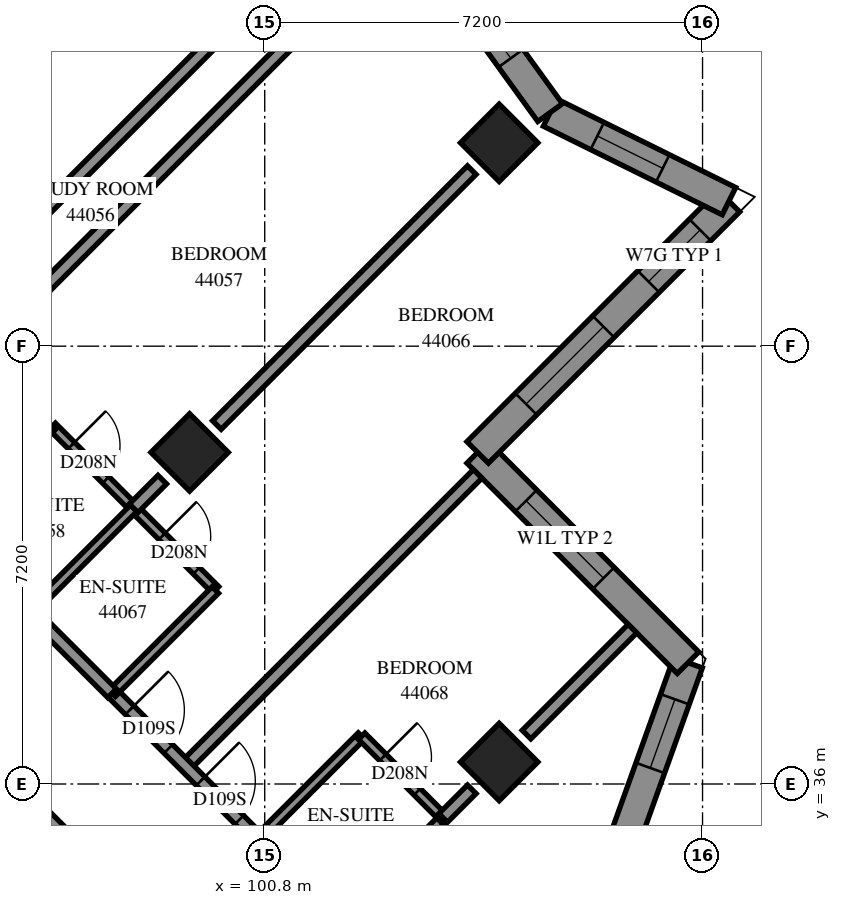
"""IFC4 building model, lengths in metres.
Left out: names, types, materials, properties, quantities, classifications, styles, units other than length and angle.
Written with IfcOpenShell. Run it as: python <this file> out.ifc"""

import sys

from ifc_helpers import new_model, si_unit, direction, frame, frame_2d, origin, origin_2d, place, context, subcontext, project, spatial, polyline, rectangle, outline, extrude, element, fill, save


model = new_model("IFC4")
c1 = context("Model", 3, precision=1e-05, world=origin(), true_north=direction((0.0, 1.0)))
c2 = subcontext(c1, "Body", "Model", "MODEL_VIEW")
j1 = project(units=[si_unit("LENGTHUNIT", "METRE"), si_unit("PLANEANGLEUNIT", "RADIAN")], contexts=[c1])
p1 = place(None, origin())
s1 = spatial("IfcSite", under=j1, at=p1, CompositionType="ELEMENT")
p2 = place(p1, origin())
s2 = spatial("IfcBuilding", under=s1, at=p2, CompositionType="ELEMENT")
p3 = place(p2, frame((0.0, 0.0, 162.6)))
s3 = spatial("IfcBuildingStorey", under=s2, at=p3, CompositionType="ELEMENT", Elevation=162.6)
for number, where, z_axis, x_axis in (
    (1, (104.656, 46.544, 0.0), (0.0, 0.0, 1.0), (0.707, -0.707, 0.0)),
    (2, (99.565, 41.453, 0.0), (0.0, 0.0, 1.0), (0.707, -0.707, 0.0)),
    (3, (104.656, 36.362, 0.0), (0.0, 0.0, 1.0), (0.707, -0.707, 0.0)),
):
    element("IfcColumn", number, at=place(p3, frame(where, z_axis=z_axis, x_axis=x_axis)), inside=s3, PredefinedType="COLUMN", context=c2, shape_type="SweptSolid", body=[
        extrude(rectangle(XDim=0.9, YDim=0.9, at=origin_2d()), origin(), (0.0, 0.0, 1.0), 3.1),
    ])
p4 = place(p3, frame((87.049, 38.695, -0.3), z_axis=(0.0, 0.0, 1.0), x_axis=(0.7071067812, 0.7071067812, 0.0)))
e4 = element("IfcWall", 4, at=p4, inside=s3, PredefinedType="SHEAR", context=c2, shape_type="SweptSolid", body=[
    extrude(rectangle(XDim=14.4, YDim=0.6, at=frame_2d((7.2, 0.0))), origin(), (0.0, 0.0, 1.0), 2.7),
])
p5 = place(p4, frame((4.55, 0.0, 0.3)))
e5 = element("IfcOpeningElement", 5, at=p5, cuts=e4, PredefinedType="OPENING", context=c2, shape_type="SweptSolid", body=[
    extrude(rectangle(XDim=1.1, YDim=2.1, at=frame_2d((0.55, 1.05))), frame((0.0, 0.31, 0.0), z_axis=(0.0, -1.0, 0.0), x_axis=(1.0, 0.0, 0.0)), (0.0, 0.0, 1.0), 0.62),
])
p6 = place(p4, frame((11.35, 0.0, 0.3)))
e6 = element("IfcOpeningElement", 6, at=p6, cuts=e4, PredefinedType="OPENING", context=c2, shape_type="SweptSolid", body=[
    extrude(rectangle(XDim=1.1, YDim=2.1, at=frame_2d((0.55, 1.05))), frame((0.0, 0.31, 0.0), z_axis=(0.0, -1.0, 0.0), x_axis=(1.0, 0.0, 0.0)), (0.0, 0.0, 1.0), 0.62),
])
p7 = place(p3, frame((105.954, 32.957, 0.0), z_axis=(0.0, 0.0, 1.0), x_axis=(0.3376937102, 0.9412560534, 0.0)))
e7 = element("IfcWall", 7, at=p7, inside=s3, PredefinedType="SOLIDWALL", context=c2, shape_type="SweptSolid", body=[
    extrude(outline(polyline([(-0.113, -0.25), (5.51, -0.25), (5.193, 0.25), (0.113, 0.25), (-0.113, -0.25)])), origin(), (0.0, 0.0, 1.0), 3.1),
])
p8 = place(p7, frame((1.173, 0.0, 0.45)))
e8 = element("IfcOpeningElement", 8, at=p8, cuts=e7, PredefinedType="OPENING", context=c2, shape_type="SweptSolid", body=[
    extrude(rectangle(XDim=1.2, YDim=2.5, at=frame_2d((0.6, 1.25))), frame((0.0, 0.26, 0.0), z_axis=(0.0, -1.0, 0.0), x_axis=(1.0, 0.0, 0.0)), (0.0, 0.0, 1.0), 0.52),
])
p9 = place(p7, frame((3.513, 0.0, 0.45)))
e9 = element("IfcOpeningElement", 9, at=p9, cuts=e7, PredefinedType="OPENING", context=c2, shape_type="SweptSolid", body=[
    extrude(rectangle(XDim=1.2, YDim=2.5, at=frame_2d((0.6, 1.25))), frame((0.0, 0.26, 0.0), z_axis=(0.0, -1.0, 0.0), x_axis=(1.0, 0.0, 0.0)), (0.0, 0.0, 1.0), 0.52),
])
p10 = place(p3, frame((107.761, 37.994, 0.0), z_axis=(0.0, 0.0, 1.0), x_axis=(-0.707127224, 0.7070863378, 0.0)))
e10 = element("IfcWall", 10, at=p10, inside=s3, PredefinedType="SOLIDWALL", context=c2, shape_type="SweptSolid", body=[
    extrude(outline(polyline([(-0.159, -0.25), (4.642, -0.25), (5.142, 0.25), (0.159, 0.25), (-0.159, -0.25)])), origin(), (0.0, 0.0, 1.0), 3.1),
])
p11 = place(p10, frame((1.967, 0.0, 0.6)))
e11 = element("IfcOpeningElement", 11, at=p11, cuts=e10, PredefinedType="OPENING", context=c2, shape_type="SweptSolid", body=[
    extrude(rectangle(XDim=1.8, YDim=1.9, at=frame_2d((0.9, 0.95))), frame((0.0, 0.26, 0.0), z_axis=(0.0, -1.0, 0.0), x_axis=(1.0, 0.0, 0.0)), (0.0, 0.0, 1.0), 0.52),
])
p12 = place(p3, frame((104.302, 41.453, 0.0), z_axis=(0.0, 0.0, 1.0), x_axis=(0.7071153373, 0.707098225, 0.0)))
e12 = element("IfcWall", 12, at=p12, inside=s3, PredefinedType="SOLIDWALL", context=c2, shape_type="SweptSolid", body=[
    extrude(outline(polyline([(0.25, -0.25), (6.192, -0.25), (5.495, 0.25), (-0.25, 0.25), (0.25, -0.25)])), origin(), (0.0, 0.0, 1.0), 3.1),
])
p13 = place(p12, frame((1.125, 0.0, 0.6)))
e13 = element("IfcOpeningElement", 13, at=p13, cuts=e12, PredefinedType="OPENING", context=c2, shape_type="SweptSolid", body=[
    extrude(rectangle(XDim=1.8, YDim=1.9, at=frame_2d((0.9, 0.95))), frame((0.0, 0.26, 0.0), z_axis=(0.0, -1.0, 0.0), x_axis=(1.0, 0.0, 0.0)), (0.0, 0.0, 1.0), 0.52),
])
p14 = place(p12, frame((3.973, 0.0, 0.6)))
e14 = element("IfcOpeningElement", 14, at=p14, cuts=e12, PredefinedType="OPENING", context=c2, shape_type="SweptSolid", body=[
    extrude(rectangle(XDim=1.2, YDim=1.9, at=frame_2d((0.6, 0.95))), frame((0.0, 0.26, 0.0), z_axis=(0.0, -1.0, 0.0), x_axis=(1.0, 0.0, 0.0)), (0.0, 0.0, 1.0), 0.52),
])
p15 = place(p3, frame((108.434, 45.585, 0.0), z_axis=(0.0, 0.0, 1.0), x_axis=(-0.8962055872, 0.443638981, 0.0)))
e15 = element("IfcWall", 15, at=p15, inside=s3, PredefinedType="SOLIDWALL", context=c2, shape_type="SweptSolid", body=[
    extrude(outline(polyline([(-0.348, -0.25), (3.22, -0.25), (3.344, 0.25), (0.348, 0.25), (-0.348, -0.25)])), origin(), (0.0, 0.0, 1.0), 3.1),
])
p16 = place(p15, frame((1.215, 0.0, 0.45)))
e16 = element("IfcOpeningElement", 16, at=p16, cuts=e15, PredefinedType="OPENING", context=c2, shape_type="SweptSolid", body=[
    extrude(rectangle(XDim=1.2, YDim=2.5, at=frame_2d((0.6, 1.25))), frame((0.0, 0.26, 0.0), z_axis=(0.0, -1.0, 0.0), x_axis=(1.0, 0.0, 0.0)), (0.0, 0.0, 1.0), 0.52),
])
p17 = place(p3, frame((105.493, 47.041, 0.0), z_axis=(0.0, 0.0, 1.0), x_axis=(-0.5862701639, 0.8101156059, 0.0)))
e17 = element("IfcWall", 17, at=p17, inside=s3, PredefinedType="SOLIDWALL", context=c2, shape_type="SweptSolid", body=[
    extrude(outline(polyline([(0.062, -0.25), (3.486, -0.25), (3.406, 0.25), (-0.062, 0.25), (0.062, -0.25)])), origin(), (0.0, 0.0, 1.0), 3.1),
])
p18 = place(p17, frame((1.103, 0.0, 0.45)))
e18 = element("IfcOpeningElement", 18, at=p18, cuts=e17, PredefinedType="OPENING", context=c2, shape_type="SweptSolid", body=[
    extrude(rectangle(XDim=1.2, YDim=2.5, at=frame_2d((0.6, 1.25))), frame((0.0, 0.26, 0.0), z_axis=(0.0, -1.0, 0.0), x_axis=(1.0, 0.0, 0.0)), (0.0, 0.0, 1.0), 0.52),
])
p19 = place(p3, frame((94.401, 41.383, 0.0), z_axis=(0.0, 0.0, 1.0), x_axis=(0.7071067812, 0.7071067812, 0.0)))
e19 = element("IfcWall", 19, at=p19, inside=s3, PredefinedType="PARTITIONING", context=c2, shape_type="SweptSolid", body=[
    extrude(rectangle(XDim=12.066, YDim=0.2, at=frame_2d((6.033, 0.0))), origin(), (0.0, 0.0, 1.0), 3.1),
])
p20 = place(p3, frame((92.209, 40.459, 0.0), z_axis=(0.0, 0.0, 1.0), x_axis=(0.7071067812, -0.7071067812, 0.0)))
e20 = element("IfcWall", 20, at=p20, inside=s3, PredefinedType="PARTITIONING", context=c2, shape_type="SweptSolid", body=[
    extrude(rectangle(XDim=11.698, YDim=0.2, at=frame_2d((5.849, 0.0))), origin(), (0.0, 0.0, 1.0), 3.1),
])
p21 = place(p20, frame((2.908, 0.0, 0.0)))
e21 = element("IfcOpeningElement", 21, at=p21, cuts=e20, PredefinedType="OPENING", context=c2, shape_type="SweptSolid", body=[
    extrude(rectangle(XDim=0.9, YDim=2.1, at=frame_2d((0.45, 1.05))), frame((0.0, 0.11, 0.0), z_axis=(0.0, -1.0, 0.0), x_axis=(1.0, 0.0, 0.0)), (0.0, 0.0, 1.0), 0.22),
])
p22 = place(p20, frame((10.181, 0.0, 0.0)))
e22 = element("IfcOpeningElement", 22, at=p22, cuts=e20, PredefinedType="OPENING", context=c2, shape_type="SweptSolid", body=[
    extrude(rectangle(XDim=0.9, YDim=2.1, at=frame_2d((0.45, 1.05))), frame((0.0, 0.11, 0.0), z_axis=(0.0, -1.0, 0.0), x_axis=(1.0, 0.0, 0.0)), (0.0, 0.0, 1.0), 0.22),
])
p23 = place(p3, frame((93.767, 42.021, 0.0), z_axis=(0.0, 0.0, 1.0), x_axis=(0.7071067812, 0.7071067812, 0.0)))
e23 = element("IfcWall", 23, at=p23, inside=s3, PredefinedType="PARTITIONING", context=c2, shape_type="SweptSolid", body=[
    extrude(rectangle(XDim=9.998, YDim=0.2, at=frame_2d((4.999, 0.0))), origin(), (0.0, 0.0, 1.0), 3.1),
])
p24 = place(p23, frame((0.196, 0.0, 0.0)))
e24 = element("IfcOpeningElement", 24, at=p24, cuts=e23, PredefinedType="OPENING", context=c2, shape_type="SweptSolid", body=[
    extrude(rectangle(XDim=1.0, YDim=2.1, at=frame_2d((0.5, 1.05))), frame((0.0, 0.11, 0.0), z_axis=(0.0, -1.0, 0.0), x_axis=(1.0, 0.0, 0.0)), (0.0, 0.0, 1.0), 0.22),
])
p25 = place(p3, frame((99.494, 36.292, 0.0), z_axis=(0.0, 0.0, 1.0), x_axis=(0.7071067812, 0.7071067812, 0.0)))
e25 = element("IfcWall", 25, at=p25, inside=s3, PredefinedType="PARTITIONING", context=c2, shape_type="SweptSolid", body=[
    extrude(rectangle(XDim=6.799, YDim=0.2, at=frame_2d((3.4, 0.0))), origin(), (0.0, 0.0, 1.0), 3.1),
])
p26 = place(p3, frame((100.013, 41.903, 0.0), z_axis=(0.0, 0.0, 1.0), x_axis=(0.7071067812, 0.7071067812, 0.0)))
e26 = element("IfcWall", 26, at=p26, inside=s3, PredefinedType="PARTITIONING", context=c2, shape_type="SweptSolid", body=[
    extrude(rectangle(XDim=5.928, YDim=0.2, at=frame_2d((2.964, 0.0))), origin(), (0.0, 0.0, 1.0), 3.1),
])
p27 = place(p3, frame((98.295, 37.497, 0.0), z_axis=(0.0, 0.0, 1.0), x_axis=(0.7071067812, -0.7071067812, 0.0)))
e27 = element("IfcWall", 27, at=p27, inside=s3, PredefinedType="PARTITIONING", context=c2, shape_type="SweptSolid", body=[
    extrude(rectangle(XDim=5.301, YDim=0.2, at=frame_2d((2.65, 0.0))), origin(), (0.0, 0.0, 1.0), 3.1),
])
p28 = place(p27, frame((0.401, 0.0, 0.0)))
e28 = element("IfcOpeningElement", 28, at=p28, cuts=e27, PredefinedType="OPENING", context=c2, shape_type="SweptSolid", body=[
    extrude(rectangle(XDim=0.9, YDim=2.1, at=frame_2d((0.45, 1.05))), frame((0.0, 0.11, 0.0), z_axis=(0.0, -1.0, 0.0), x_axis=(1.0, 0.0, 0.0)), (0.0, 0.0, 1.0), 0.22),
])
p29 = place(p27, frame((2.05, 0.0, 0.0)))
e29 = element("IfcOpeningElement", 29, at=p29, cuts=e27, PredefinedType="OPENING", context=c2, shape_type="SweptSolid", body=[
    extrude(rectangle(XDim=0.9, YDim=2.1, at=frame_2d((0.45, 1.05))), frame((0.0, 0.11, 0.0), z_axis=(0.0, -1.0, 0.0), x_axis=(1.0, 0.0, 0.0)), (0.0, 0.0, 1.0), 0.22),
])
p30 = place(p3, frame((97.305, 41.881, 0.0), z_axis=(0.0, 0.0, 1.0), x_axis=(0.7067382634, -0.707475107, 0.0)))
e30 = element("IfcWall", 30, at=p30, inside=s3, PredefinedType="PARTITIONING", context=c2, shape_type="SweptSolid", body=[
    extrude(rectangle(XDim=3.8, YDim=0.15, at=frame_2d((1.9, 0.0))), origin(), (0.0, 0.0, 1.0), 3.1),
])
p31 = place(p30, frame((0.445, 0.0, 0.0)))
e31 = element("IfcOpeningElement", 31, at=p31, cuts=e30, PredefinedType="OPENING", context=c2, shape_type="SweptSolid", body=[
    extrude(rectangle(XDim=0.8, YDim=2.1, at=frame_2d((0.4, 1.05))), frame((0.0, 0.085, 0.0), z_axis=(0.0, -1.0, 0.0), x_axis=(1.0, 0.0, 0.0)), (0.0, 0.0, 1.0), 0.17),
])
p32 = place(p30, frame((2.556, 0.0, 0.0)))
e32 = element("IfcOpeningElement", 32, at=p32, cuts=e30, PredefinedType="OPENING", context=c2, shape_type="SweptSolid", body=[
    extrude(rectangle(XDim=0.8, YDim=2.1, at=frame_2d((0.4, 1.05))), frame((0.0, 0.085, 0.0), z_axis=(0.0, -1.0, 0.0), x_axis=(1.0, 0.0, 0.0)), (0.0, 0.0, 1.0), 0.17),
])
p33 = place(p3, frame((105.105, 36.813, 0.0), z_axis=(0.0, 0.0, 1.0), x_axis=(0.7071067812, 0.7071067812, 0.0)))
e33 = element("IfcWall", 33, at=p33, inside=s3, PredefinedType="PARTITIONING", context=c2, shape_type="SweptSolid", body=[
    extrude(rectangle(XDim=2.463, YDim=0.2, at=frame_2d((1.232, 0.0))), origin(), (0.0, 0.0, 1.0), 3.1),
])
for number, where, z_axis, x_axis in (
    (34, (95.603, 40.181, 0.0), (0.0, 0.0, 1.0), (0.707, 0.707, 0.0)),
    (35, (96.947, 38.837, 0.0), (0.0, 0.0, 1.0), (0.707, 0.707, 0.0)),
):
    element("IfcWall", number, at=place(p3, frame(where, z_axis=z_axis, x_axis=x_axis)), inside=s3, PredefinedType="PARTITIONING", context=c2, shape_type="SweptSolid", body=[
        extrude(rectangle(XDim=2.401, YDim=0.15, at=frame_2d((1.201, 0.0))), origin(), (0.0, 0.0, 1.0), 3.1),
    ])
p34 = place(p3, frame((100.693, 35.093, 0.0), z_axis=(0.0, 0.0, 1.0), x_axis=(0.7075233388, 0.706689978, 0.0)))
e36 = element("IfcWall", 36, at=p34, inside=s3, PredefinedType="PARTITIONING", context=c2, shape_type="SweptSolid", body=[
    extrude(rectangle(XDim=2.4, YDim=0.15, at=frame_2d((1.2, 0.0))), origin(), (0.0, 0.0, 1.0), 3.1),
])
p35 = place(p3, frame((98.291, 37.495, 0.0), z_axis=(0.0, 0.0, 1.0), x_axis=(0.7071067812, 0.7071067812, 0.0)))
e37 = element("IfcWall", 37, at=p35, inside=s3, PredefinedType="PARTITIONING", context=c2, shape_type="SweptSolid", body=[
    extrude(rectangle(XDim=2.398, YDim=0.15, at=frame_2d((1.199, 0.0))), origin(), (0.0, 0.0, 1.0), 3.1),
])
p36 = place(p3, frame((102.039, 33.747, 0.0), z_axis=(0.0, 0.0, 1.0), x_axis=(0.7071067812, 0.7071067812, 0.0)))
e38 = element("IfcWall", 38, at=p36, inside=s3, PredefinedType="PARTITIONING", context=c2, shape_type="SweptSolid", body=[
    extrude(rectangle(XDim=2.398, YDim=0.15, at=frame_2d((1.199, 0.0))), origin(), (0.0, 0.0, 1.0), 2.6),
])
p37 = place(p3, frame((96.946, 38.834, 0.0), z_axis=(0.0, 0.0, 1.0), x_axis=(0.7076330979, -0.7065800724, 0.0)))
e39 = element("IfcWall", 39, at=p37, inside=s3, PredefinedType="PARTITIONING", context=c2, shape_type="SweptSolid", body=[
    extrude(rectangle(XDim=1.899, YDim=0.2, at=frame_2d((0.95, 0.0))), origin(), (0.0, 0.0, 1.0), 3.1),
])
p38 = place(p3, frame((102.394, 36.786, 0.0), z_axis=(0.0, 0.0, 1.0), x_axis=(0.7065800724, -0.7076330979, 0.0)))
e40 = element("IfcWall", 40, at=p38, inside=s3, PredefinedType="PARTITIONING", context=c2, shape_type="SweptSolid", body=[
    extrude(rectangle(XDim=1.899, YDim=0.15, at=frame_2d((0.95, 0.0))), origin(), (0.0, 0.0, 1.0), 3.1),
])
p39 = place(p38, frame((0.492, 0.0, 0.0)))
e41 = element("IfcOpeningElement", 41, at=p39, cuts=e40, PredefinedType="OPENING", context=c2, shape_type="SweptSolid", body=[
    extrude(rectangle(XDim=0.8, YDim=2.1, at=frame_2d((0.4, 1.05))), frame((0.0, 0.085, 0.0), z_axis=(0.0, -1.0, 0.0), x_axis=(1.0, 0.0, 0.0)), (0.0, 0.0, 1.0), 0.17),
])
p40 = place(p3, frame((103.735, 35.443, 0.0), z_axis=(0.0, 0.0, 1.0), x_axis=(0.7071067812, 0.7071067812, 0.0)))
e42 = element("IfcWall", 42, at=p40, inside=s3, PredefinedType="PARTITIONING", context=c2, shape_type="SweptSolid", body=[
    extrude(rectangle(XDim=0.665, YDim=0.2, at=frame_2d((0.332, 0.0))), origin(), (0.0, 0.0, 1.0), 2.6),
])
p41 = place(p3, frame((98.645, 40.535, 0.0), z_axis=(0.0, 0.0, 1.0), x_axis=(0.7071067812, 0.7071067812, 0.0)))
e43 = element("IfcWall", 43, at=p41, inside=s3, PredefinedType="PARTITIONING", context=c2, shape_type="SweptSolid", body=[
    extrude(rectangle(XDim=0.665, YDim=0.2, at=frame_2d((0.332, 0.0))), origin(), (0.0, 0.0, 1.0), 3.1),
])
p42 = place(p9, origin())
e44 = element("IfcWindow", 44, at=p42, inside=s3, PartitioningType="SINGLE_PANEL", PredefinedType="WINDOW", context=c2, shape_type="SweptSolid", body=[
    extrude(rectangle(XDim=1.2, YDim=2.5, at=frame_2d((0.6, 1.25))), frame((0.0, 0.18, 0.0), z_axis=(0.0, -1.0, 0.0), x_axis=(1.0, 0.0, 0.0)), (0.0, 0.0, 1.0), 0.06),
])
fill(e9, e44)
p43 = place(p11, origin())
e45 = element("IfcWindow", 45, at=p43, inside=s3, PartitioningType="SINGLE_PANEL", PredefinedType="WINDOW", context=c2, shape_type="SweptSolid", body=[
    extrude(rectangle(XDim=1.8, YDim=1.9, at=frame_2d((0.9, 0.95))), frame((0.0, 0.18, 0.0), z_axis=(0.0, -1.0, 0.0), x_axis=(1.0, 0.0, 0.0)), (0.0, 0.0, 1.0), 0.06),
])
fill(e11, e45)
p44 = place(p13, origin())
e46 = element("IfcWindow", 46, at=p44, inside=s3, PartitioningType="SINGLE_PANEL", PredefinedType="WINDOW", context=c2, shape_type="SweptSolid", body=[
    extrude(rectangle(XDim=1.8, YDim=1.9, at=frame_2d((0.9, 0.95))), frame((0.0, 0.18, 0.0), z_axis=(0.0, -1.0, 0.0), x_axis=(1.0, 0.0, 0.0)), (0.0, 0.0, 1.0), 0.06),
])
fill(e13, e46)
p45 = place(p14, origin())
e47 = element("IfcWindow", 47, at=p45, inside=s3, PartitioningType="SINGLE_PANEL", PredefinedType="WINDOW", context=c2, shape_type="SweptSolid", body=[
    extrude(rectangle(XDim=1.2, YDim=1.9, at=frame_2d((0.6, 0.95))), frame((0.0, 0.18, 0.0), z_axis=(0.0, -1.0, 0.0), x_axis=(1.0, 0.0, 0.0)), (0.0, 0.0, 1.0), 0.06),
])
fill(e14, e47)
p46 = place(p16, origin())
e48 = element("IfcWindow", 48, at=p46, inside=s3, PartitioningType="SINGLE_PANEL", PredefinedType="WINDOW", context=c2, shape_type="SweptSolid", body=[
    extrude(rectangle(XDim=1.2, YDim=2.5, at=frame_2d((0.6, 1.25))), frame((0.0, 0.18, 0.0), z_axis=(0.0, -1.0, 0.0), x_axis=(1.0, 0.0, 0.0)), (0.0, 0.0, 1.0), 0.06),
])
fill(e16, e48)
p47 = place(p18, origin())
e49 = element("IfcWindow", 49, at=p47, inside=s3, PartitioningType="SINGLE_PANEL", PredefinedType="WINDOW", context=c2, shape_type="SweptSolid", body=[
    extrude(rectangle(XDim=1.2, YDim=2.5, at=frame_2d((0.6, 1.25))), frame((0.0, 0.18, 0.0), z_axis=(0.0, -1.0, 0.0), x_axis=(1.0, 0.0, 0.0)), (0.0, 0.0, 1.0), 0.06),
])
fill(e18, e49)
p48 = place(p31, origin())
e50 = element("IfcDoor", 50, at=p48, inside=s3, OperationType="SINGLE_SWING_RIGHT", PredefinedType="DOOR", context=c2, shape_type="SweptSolid", body=[
    extrude(rectangle(XDim=0.8, YDim=2.1, at=frame_2d((0.4, 1.05))), frame((0.0, 0.025, 0.0), z_axis=(0.0, -1.0, 0.0), x_axis=(1.0, 0.0, 0.0)), (0.0, 0.0, 1.0), 0.05),
])
fill(e31, e50)
p49 = place(p28, origin())
e51 = element("IfcDoor", 51, at=p49, inside=s3, OperationType="SINGLE_SWING_LEFT", PredefinedType="DOOR", context=c2, shape_type="SweptSolid", body=[
    extrude(rectangle(XDim=0.9, YDim=2.1, at=frame_2d((0.45, 1.05))), frame((0.0, 0.025, 0.0), z_axis=(0.0, -1.0, 0.0), x_axis=(1.0, 0.0, 0.0)), (0.0, 0.0, 1.0), 0.05),
])
fill(e28, e51)
p50 = place(p32, origin())
e52 = element("IfcDoor", 52, at=p50, inside=s3, OperationType="SINGLE_SWING_RIGHT", PredefinedType="DOOR", context=c2, shape_type="SweptSolid", body=[
    extrude(rectangle(XDim=0.8, YDim=2.1, at=frame_2d((0.4, 1.05))), frame((0.0, 0.025, 0.0), z_axis=(0.0, -1.0, 0.0), x_axis=(1.0, 0.0, 0.0)), (0.0, 0.0, 1.0), 0.05),
])
fill(e32, e52)
p51 = place(p29, origin())
e53 = element("IfcDoor", 53, at=p51, inside=s3, OperationType="SINGLE_SWING_RIGHT", PredefinedType="DOOR", context=c2, shape_type="SweptSolid", body=[
    extrude(rectangle(XDim=0.9, YDim=2.1, at=frame_2d((0.45, 1.05))), frame((0.0, 0.025, 0.0), z_axis=(0.0, -1.0, 0.0), x_axis=(1.0, 0.0, 0.0)), (0.0, 0.0, 1.0), 0.05),
])
fill(e29, e53)
p52 = place(p39, origin())
e54 = element("IfcDoor", 54, at=p52, inside=s3, OperationType="SINGLE_SWING_RIGHT", PredefinedType="DOOR", context=c2, shape_type="SweptSolid", body=[
    extrude(rectangle(XDim=0.8, YDim=2.1, at=frame_2d((0.4, 1.05))), frame((0.0, 0.025, 0.0), z_axis=(0.0, -1.0, 0.0), x_axis=(1.0, 0.0, 0.0)), (0.0, 0.0, 1.0), 0.05),
])
fill(e41, e54)
save(model, sys.argv[1])
